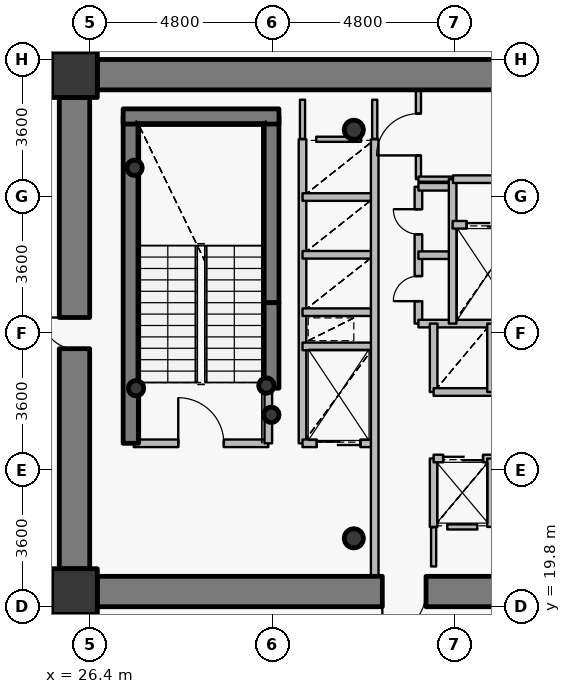
"""IFC4 building model, lengths in metres.
Left out: names, types, materials, properties, quantities, classifications, styles, units other than length and angle.
Written with IfcOpenShell. Run it as: python <this file> out.ifc"""

import sys

from ifc_helpers import new_model, si_unit, direction, frame, frame_2d, origin, origin_2d, place, context, subcontext, project, spatial, rectangle, hollow_circle, extrude, source, transform, mapped, element, fill, save


model = new_model("IFC4")
c1 = context("Model", 3, precision=1e-05, world=origin(), true_north=direction((0.0, 1.0)))
c2 = subcontext(c1, "Body", "Model", "MODEL_VIEW")
j1 = project(units=[si_unit("LENGTHUNIT", "METRE"), si_unit("PLANEANGLEUNIT", "RADIAN")], contexts=[c1])
p1 = place(None, origin())
s1 = spatial("IfcSite", under=j1, at=p1, CompositionType="ELEMENT")
p2 = place(p1, origin())
s2 = spatial("IfcBuilding", under=s1, at=p2, CompositionType="ELEMENT")
p3 = place(p2, frame((0.0, 0.0, 104.7)))
s3 = spatial("IfcBuildingStorey", under=s2, at=p3, CompositionType="ELEMENT", Elevation=104.7)
for number, where, z_axis, x_axis in (
    (1, (26.0, 20.2, 0.0), (0.0, 0.0, 1.0), (1.0, 0.0, 0.0)),
    (2, (26.0, 33.8, 0.0), (0.0, 0.0, 1.0), (1.0, 0.0, 0.0)),
):
    element("IfcColumn", number, at=place(p3, frame(where, z_axis=z_axis, x_axis=x_axis)), inside=s3, PredefinedType="COLUMN", context=c2, shape_type="SweptSolid", body=[
        extrude(rectangle(XDim=1.2, YDim=1.2, at=origin_2d()), origin(), (0.0, 0.0, 1.0), 3.75),
    ])
for number, where, z_axis, x_axis in (
    (3, (33.35, 21.6, 0.0), (0.0, 0.0, 1.0), (1.0, 0.0, 0.0)),
    (4, (33.35, 32.35, 0.0), (0.0, 0.0, 1.0), (1.0, 0.0, 0.0)),
):
    element("IfcColumn", number, at=place(p3, frame(where, z_axis=z_axis, x_axis=x_axis)), inside=s3, PredefinedType="COLUMN", context=c2, shape_type="SweptSolid", body=[
        extrude(hollow_circle(Radius=0.254, WallThickness=0.02, at=origin_2d()), origin(), (0.0, 0.0, 1.0), 3.75),
    ])
p4 = place(p3, frame((27.48, 24.1, 0.0), z_axis=(0.0, 0.0, 1.0), x_axis=(0.0, 1.0, 0.0)))
e5 = element("IfcWall", 5, at=p4, inside=s3, PredefinedType="SHEAR", context=c2, shape_type="SweptSolid", body=[
    extrude(rectangle(XDim=8.6, YDim=0.4, at=frame_2d((4.3, 0.0))), origin(), (0.0, 0.0, 1.0), 3.75),
])
p5 = place(p3, frame((31.18, 27.8, 0.0), z_axis=(0.0, 0.0, 1.0), x_axis=(0.0, 1.0, 0.0)))
e6 = element("IfcWall", 6, at=p5, inside=s3, PredefinedType="SHEAR", context=c2, shape_type="SweptSolid", body=[
    extrude(rectangle(XDim=4.9, YDim=0.4, at=frame_2d((2.45, 0.0))), origin(), (0.0, 0.0, 1.0), 3.75),
])
p6 = place(p3, frame((27.28, 32.7, 0.0), z_axis=(0.0, 0.0, 1.0), x_axis=(1.0, 0.0, 0.0)))
e7 = element("IfcWall", 7, at=p6, inside=s3, PredefinedType="SHEAR", context=c2, shape_type="SweptSolid", body=[
    extrude(rectangle(XDim=4.1, YDim=0.4, at=frame_2d((2.05, 0.0))), origin(), (0.0, 0.0, 1.0), 3.75),
])
for number, where, z_axis, x_axis in (
    (8, (27.58, 31.35, 0.0), (0.0, 0.0, 1.0), (1.0, 0.0, 0.0)),
    (9, (31.05, 25.62, 0.0), (0.0, 0.0, 1.0), (1.0, 0.0, 0.0)),
    (10, (31.18, 24.85, 0.0), (0.0, 0.0, 1.0), (1.0, 0.0, 0.0)),
    (11, (27.62, 25.55, 0.0), (0.0, 0.0, 1.0), (1.0, 0.0, 0.0)),
):
    element("IfcColumn", number, at=place(p3, frame(where, z_axis=z_axis, x_axis=x_axis)), inside=s3, PredefinedType="COLUMN", context=c2, shape_type="SweptSolid", body=[
        extrude(hollow_circle(Radius=0.203, WallThickness=0.016, at=origin_2d()), origin(), (0.0, 0.0, 1.0), 3.75),
    ])
p7 = place(p3, frame((26.6, 33.8, 0.0), z_axis=(0.0, 0.0, 1.0), x_axis=(1.0, 0.0, 0.0)))
e12 = element("IfcWall", 12, at=p7, inside=s3, PredefinedType="SHEAR", context=c2, shape_type="SweptSolid", body=[
    extrude(rectangle(XDim=18.8, YDim=0.8, at=frame_2d((9.4, 0.0))), origin(), (0.0, 0.0, 1.0), 2.95),
])
p8 = place(p3, frame((45.4, 20.2, 0.0), z_axis=(0.0, 0.0, 1.0), x_axis=(-1.0, 0.0, 0.0)))
e13 = element("IfcWall", 13, at=p8, inside=s3, PredefinedType="SHEAR", context=c2, shape_type="SweptSolid", body=[
    extrude(rectangle(XDim=18.8, YDim=0.8, at=frame_2d((9.4, 0.0))), origin(), (0.0, 0.0, 1.0), 2.95),
])
p9 = place(p8, frame((10.15, 0.0, 0.0)))
e14 = element("IfcOpeningElement", 14, at=p9, cuts=e13, PredefinedType="OPENING", context=c2, shape_type="SweptSolid", body=[
    extrude(rectangle(XDim=1.15, YDim=2.15, at=origin_2d()), frame((0.575, 0.41, 1.075), z_axis=(0.0, -1.0, 0.0), x_axis=(1.0, 0.0, 0.0)), (0.0, 0.0, 1.0), 0.82),
])
p10 = place(p3, frame((26.0, 20.8, 0.0), z_axis=(0.0, 0.0, 1.0), x_axis=(0.0, 1.0, 0.0)))
e15 = element("IfcWall", 15, at=p10, inside=s3, PredefinedType="SHEAR", context=c2, shape_type="SweptSolid", body=[
    extrude(rectangle(XDim=12.4, YDim=0.8, at=frame_2d((6.2, 0.0))), origin(), (0.0, 0.0, 1.0), 2.95),
])
p11 = place(p10, frame((5.79, 0.0, 0.0)))
e16 = element("IfcOpeningElement", 16, at=p11, cuts=e15, PredefinedType="OPENING", context=c2, shape_type="SweptSolid", body=[
    extrude(rectangle(XDim=0.82, YDim=2.1, at=origin_2d()), frame((0.41, 0.41, 1.05), z_axis=(0.0, -1.0, 0.0), x_axis=(1.0, 0.0, 0.0)), (0.0, 0.0, 1.0), 0.82),
])
p12 = place(p3, frame((31.18, 25.55, 0.0), z_axis=(0.0, 0.0, 1.0), x_axis=(0.0, 1.0, 0.0)))
e17 = element("IfcWall", 17, at=p12, inside=s3, PredefinedType="SHEAR", context=c2, shape_type="SweptSolid", body=[
    extrude(rectangle(XDim=2.25, YDim=0.4, at=frame_2d((1.125, 0.0))), origin(), (0.0, 0.0, 1.0), 3.1),
])
p13 = place(p3, frame((27.56, 24.1, 0.0), z_axis=(0.0, 0.0, 1.0), x_axis=(1.0, 0.0, 0.0)))
e18 = element("IfcWall", 18, at=p13, inside=s3, PredefinedType="PARTITIONING", context=c2, shape_type="SweptSolid", body=[
    extrude(rectangle(XDim=3.54, YDim=0.2, at=frame_2d((1.77, 0.0))), origin(), (0.0, 0.0, 1.0), 3.5),
])
p14 = place(p13, frame((1.17, 0.0, 0.0)))
e19 = element("IfcOpeningElement", 19, at=p14, cuts=e18, PredefinedType="OPENING", context=c2, shape_type="SweptSolid", body=[
    extrude(rectangle(XDim=1.2, YDim=2.15, at=origin_2d()), frame((0.6, 0.11, 1.075), z_axis=(0.0, -1.0, 0.0), x_axis=(1.0, 0.0, 0.0)), (0.0, 0.0, 1.0), 0.22),
])
p15 = place(p3, frame((31.1, 24.1, 0.0), z_axis=(0.0, 0.0, 1.0), x_axis=(0.0, 1.0, 0.0)))
e20 = element("IfcWall", 20, at=p15, inside=s3, PredefinedType="PARTITIONING", context=c2, shape_type="SweptSolid", body=[
    extrude(rectangle(XDim=1.44, YDim=0.2, at=frame_2d((0.72, 0.0))), origin(), (0.0, 0.0, 1.0), 3.5),
])
p16 = place(p3, frame((32.0, 24.1, 0.0), z_axis=(0.0, 0.0, 1.0), x_axis=(0.0, 1.0, 0.0)))
e21 = element("IfcWall", 21, at=p16, inside=s3, PredefinedType="PARTITIONING", context=c2, shape_type="SweptSolid", body=[
    extrude(rectangle(XDim=8.0, YDim=0.2, at=frame_2d((4.0, 0.0))), origin(), (0.0, 0.0, 1.0), 3.5),
])
p17 = place(p3, frame((32.0, 24.1, 0.0), z_axis=(0.0, 0.0, 1.0), x_axis=(1.0, 0.0, 0.0)))
e22 = element("IfcWall", 22, at=p17, inside=s3, PredefinedType="PARTITIONING", context=c2, shape_type="SweptSolid", body=[
    extrude(rectangle(XDim=1.9, YDim=0.2, at=frame_2d((0.95, 0.0))), origin(), (0.0, 0.0, 1.0), 3.085),
])
p18 = place(p17, frame((0.375, 0.0, 0.0)))
e23 = element("IfcOpeningElement", 23, at=p18, cuts=e22, PredefinedType="OPENING", context=c2, shape_type="SweptSolid", body=[
    extrude(rectangle(XDim=1.15, YDim=2.15, at=origin_2d()), frame((0.575, 0.11, 1.075), z_axis=(0.0, -1.0, 0.0), x_axis=(1.0, 0.0, 0.0)), (0.0, 0.0, 1.0), 0.22),
])
for number, where, z_axis, x_axis in (
    (24, (32.0, 26.65, 0.0), (0.0, 0.0, 1.0), (1.0, 0.0, 0.0)),
    (25, (32.0, 27.55, 0.0), (0.0, 0.0, 1.0), (1.0, 0.0, 0.0)),
    (26, (32.0, 29.06, 0.0), (0.0, 0.0, 1.0), (1.0, 0.0, 0.0)),
    (27, (32.0, 30.58, 0.0), (0.0, 0.0, 1.0), (1.0, 0.0, 0.0)),
):
    element("IfcWall", number, at=place(p3, frame(where, z_axis=z_axis, x_axis=x_axis)), inside=s3, PredefinedType="PARTITIONING", context=c2, shape_type="SweptSolid", body=[
        extrude(rectangle(XDim=1.9, YDim=0.2, at=frame_2d((0.95, 0.0))), origin(), (0.0, 0.0, 1.0), 3.085),
    ])
p19 = place(p3, frame((33.9, 20.6, 0.0), z_axis=(0.0, 0.0, 1.0), x_axis=(0.0, 1.0, 0.0)))
e28 = element("IfcWall", 28, at=p19, inside=s3, PredefinedType="PARTITIONING", context=c2, shape_type="SweptSolid", body=[
    extrude(rectangle(XDim=11.5, YDim=0.2, at=frame_2d((5.75, 0.0))), origin(), (0.0, 0.0, 1.0), 3.085),
])
p20 = place(p3, frame((35.05, 27.25, 0.0), z_axis=(0.0, 0.0, 1.0), x_axis=(0.0, 1.0, 0.0)))
e29 = element("IfcWall", 29, at=p20, inside=s3, PredefinedType="PARTITIONING", context=c2, shape_type="SweptSolid", body=[
    extrude(rectangle(XDim=3.6, YDim=0.2, at=frame_2d((1.8, 0.0))), origin(), (0.0, 0.0, 1.0), 3.5),
])
p21 = place(p20, frame((0.59, 0.0, 0.0)))
e30 = element("IfcOpeningElement", 30, at=p21, cuts=e29, PredefinedType="OPENING", context=c2, shape_type="SweptSolid", body=[
    extrude(rectangle(XDim=0.66, YDim=2.05, at=origin_2d()), frame((0.33, 0.11, 1.025), z_axis=(0.0, -1.0, 0.0), x_axis=(1.0, 0.0, 0.0)), (0.0, 0.0, 1.0), 0.22),
])
p22 = place(p20, frame((2.35, 0.0, 0.0)))
e31 = element("IfcOpeningElement", 31, at=p22, cuts=e29, PredefinedType="OPENING", context=c2, shape_type="SweptSolid", body=[
    extrude(rectangle(XDim=0.66, YDim=2.05, at=origin_2d()), frame((0.33, 0.11, 1.025), z_axis=(0.0, -1.0, 0.0), x_axis=(1.0, 0.0, 0.0)), (0.0, 0.0, 1.0), 0.22),
])
p23 = place(p3, frame((35.05, 27.25, 0.0), z_axis=(0.0, 0.0, 1.0), x_axis=(1.0, 0.0, 0.0)))
e32 = element("IfcWall", 32, at=p23, inside=s3, PredefinedType="PARTITIONING", context=c2, shape_type="SweptSolid", body=[
    extrude(rectangle(XDim=4.95, YDim=0.2, at=frame_2d((2.475, 0.0))), origin(), (0.0, 0.0, 1.0), 3.085),
])
for number, where, z_axis, x_axis in (
    (33, (35.05, 29.05, 0.0), (0.0, 0.0, 1.0), (1.0, 0.0, 0.0)),
    (34, (35.05, 30.85, 0.0), (0.0, 0.0, 1.0), (1.0, 0.0, 0.0)),
):
    element("IfcWall", number, at=place(p3, frame(where, z_axis=z_axis, x_axis=x_axis)), inside=s3, PredefinedType="PARTITIONING", context=c2, shape_type="SweptSolid", body=[
        extrude(rectangle(XDim=0.9, YDim=0.2, at=frame_2d((0.45, 0.0))), origin(), (0.0, 0.0, 1.0), 3.5),
    ])
p24 = place(p3, frame((35.05, 31.05, 0.0), z_axis=(0.0, 0.0, 1.0), x_axis=(0.0, 1.0, 0.0)))
e35 = element("IfcWall", 35, at=p24, inside=s3, PredefinedType="PARTITIONING", context=c2, shape_type="SweptSolid", body=[
    extrude(rectangle(XDim=2.35, YDim=0.135, at=frame_2d((1.175, 0.0))), origin(), (0.0, 0.0, 1.0), 3.085),
])
p25 = place(p24, frame((0.625, 0.0, 0.0)))
e36 = element("IfcOpeningElement", 36, at=p25, cuts=e35, PredefinedType="OPENING", context=c2, shape_type="SweptSolid", body=[
    extrude(rectangle(XDim=1.1, YDim=2.15, at=origin_2d()), frame((0.55, 0.078, 1.075), z_axis=(0.0, -1.0, 0.0), x_axis=(1.0, 0.0, 0.0)), (0.0, 0.0, 1.0), 0.155),
])
p26 = place(p3, frame((35.05, 31.05, 0.0), z_axis=(0.0, 0.0, 1.0), x_axis=(1.0, 0.0, 0.0)))
e37 = element("IfcWall", 37, at=p26, inside=s3, PredefinedType="PARTITIONING", context=c2, shape_type="SweptSolid", body=[
    extrude(rectangle(XDim=0.9, YDim=0.135, at=frame_2d((0.45, 0.0))), origin(), (0.0, 0.0, 1.0), 3.5),
])
p27 = place(p3, frame((35.45, 21.9, 0.0), z_axis=(0.0, 0.0, 1.0), x_axis=(0.0, 1.0, 0.0)))
e38 = element("IfcWall", 38, at=p27, inside=s3, PredefinedType="PARTITIONING", context=c2, shape_type="SweptSolid", body=[
    extrude(rectangle(XDim=1.8, YDim=0.2, at=frame_2d((0.9, 0.0))), origin(), (0.0, 0.0, 1.0), 3.5),
])
p28 = place(p3, frame((35.45, 23.7, 0.0), z_axis=(0.0, 0.0, 1.0), x_axis=(1.0, 0.0, 0.0)))
e39 = element("IfcWall", 39, at=p28, inside=s3, PredefinedType="PARTITIONING", context=c2, shape_type="SweptSolid", body=[
    extrude(rectangle(XDim=4.55, YDim=0.2, at=frame_2d((2.275, 0.0))), origin(), (0.0, 0.0, 1.0), 3.085),
])
p29 = place(p28, frame((0.25, 0.0, 0.0)))
e40 = element("IfcOpeningElement", 40, at=p29, cuts=e39, PredefinedType="OPENING", context=c2, shape_type="SweptSolid", body=[
    extrude(rectangle(XDim=1.05, YDim=2.15, at=origin_2d()), frame((0.525, 0.11, 1.075), z_axis=(0.0, -1.0, 0.0), x_axis=(1.0, 0.0, 0.0)), (0.0, 0.0, 1.0), 0.22),
])
p30 = place(p28, frame((1.745, 0.0, 0.0)))
e41 = element("IfcOpeningElement", 41, at=p30, cuts=e39, PredefinedType="OPENING", context=c2, shape_type="SweptSolid", body=[
    extrude(rectangle(XDim=1.05, YDim=2.15, at=origin_2d()), frame((0.525, 0.11, 1.075), z_axis=(0.0, -1.0, 0.0), x_axis=(1.0, 0.0, 0.0)), (0.0, 0.0, 1.0), 0.22),
])
p31 = place(p28, frame((3.165, 0.0, 0.0)))
e42 = element("IfcOpeningElement", 42, at=p31, cuts=e39, PredefinedType="OPENING", context=c2, shape_type="SweptSolid", body=[
    extrude(rectangle(XDim=1.05, YDim=2.15, at=origin_2d()), frame((0.525, 0.11, 1.075), z_axis=(0.0, -1.0, 0.0), x_axis=(1.0, 0.0, 0.0)), (0.0, 0.0, 1.0), 0.22),
])
p32 = place(p3, frame((35.45, 25.45, 0.0), z_axis=(0.0, 0.0, 1.0), x_axis=(0.0, 1.0, 0.0)))
e43 = element("IfcWall", 43, at=p32, inside=s3, PredefinedType="PARTITIONING", context=c2, shape_type="SweptSolid", body=[
    extrude(rectangle(XDim=1.8, YDim=0.2, at=frame_2d((0.9, 0.0))), origin(), (0.0, 0.0, 1.0), 3.5),
])
p33 = place(p3, frame((35.45, 25.45, 0.0), z_axis=(0.0, 0.0, 1.0), x_axis=(1.0, 0.0, 0.0)))
e44 = element("IfcWall", 44, at=p33, inside=s3, PredefinedType="PARTITIONING", context=c2, shape_type="SweptSolid", body=[
    extrude(rectangle(XDim=4.55, YDim=0.2, at=frame_2d((2.275, 0.0))), origin(), (0.0, 0.0, 1.0), 3.085),
])
p34 = place(p3, frame((35.95, 27.25, 0.0), z_axis=(0.0, 0.0, 1.0), x_axis=(0.0, 1.0, 0.0)))
e45 = element("IfcWall", 45, at=p34, inside=s3, PredefinedType="PARTITIONING", context=c2, shape_type="SweptSolid", body=[
    extrude(rectangle(XDim=3.8, YDim=0.2, at=frame_2d((1.9, 0.0))), origin(), (0.0, 0.0, 1.0), 3.5),
])
p35 = place(p3, frame((35.95, 29.85, 0.0), z_axis=(0.0, 0.0, 1.0), x_axis=(1.0, 0.0, 0.0)))
e46 = element("IfcWall", 46, at=p35, inside=s3, PredefinedType="PARTITIONING", context=c2, shape_type="SweptSolid", body=[
    extrude(rectangle(XDim=8.49, YDim=0.2, at=frame_2d((4.245, 0.0))), origin(), (0.0, 0.0, 1.0), 3.085),
])
p36 = place(p35, frame((6.1, 0.0, 0.0)))
e47 = element("IfcOpeningElement", 47, at=p36, cuts=e46, PredefinedType="OPENING", context=c2, shape_type="SweptSolid", body=[
    extrude(rectangle(XDim=1.2, YDim=2.15, at=origin_2d()), frame((0.6, 0.11, 1.075), z_axis=(0.0, -1.0, 0.0), x_axis=(1.0, 0.0, 0.0)), (0.0, 0.0, 1.0), 0.22),
])
p37 = place(p35, frame((0.37, 0.0, 0.0)))
e48 = element("IfcOpeningElement", 48, at=p37, cuts=e46, PredefinedType="OPENING", context=c2, shape_type="SweptSolid", body=[
    extrude(rectangle(XDim=1.15, YDim=2.15, at=origin_2d()), frame((0.575, 0.11, 1.075), z_axis=(0.0, -1.0, 0.0), x_axis=(1.0, 0.0, 0.0)), (0.0, 0.0, 1.0), 0.22),
])
p38 = place(p35, frame((2.425, 0.0, 0.0)))
e49 = element("IfcOpeningElement", 49, at=p38, cuts=e46, PredefinedType="OPENING", context=c2, shape_type="SweptSolid", body=[
    extrude(rectangle(XDim=1.05, YDim=2.15, at=origin_2d()), frame((0.525, 0.11, 1.075), z_axis=(0.0, -1.0, 0.0), x_axis=(1.0, 0.0, 0.0)), (0.0, 0.0, 1.0), 0.22),
])
p39 = place(p3, frame((35.96, 31.05, 0.0), z_axis=(0.0, 0.0, 1.0), x_axis=(1.0, 0.0, 0.0)))
e50 = element("IfcWall", 50, at=p39, inside=s3, PredefinedType="PARTITIONING", context=c2, shape_type="SweptSolid", body=[
    extrude(rectangle(XDim=1.84, YDim=0.2, at=frame_2d((0.92, 0.0))), origin(), (0.0, 0.0, 1.0), 3.5),
])
for number, where, z_axis, x_axis in (
    (51, (36.96, 21.9, 0.0), (0.0, 0.0, 1.0), (0.0, 1.0, 0.0)),
    (52, (36.96, 25.45, 0.0), (0.0, 0.0, 1.0), (0.0, 1.0, 0.0)),
):
    element("IfcWall", number, at=place(p3, frame(where, z_axis=z_axis, x_axis=x_axis)), inside=s3, PredefinedType="PARTITIONING", context=c2, shape_type="SweptSolid", body=[
        extrude(rectangle(XDim=1.8, YDim=0.2, at=frame_2d((0.9, 0.0))), origin(), (0.0, 0.0, 1.0), 3.5),
    ])
p40 = place(p3, frame((36.6, 21.9, 0.0), z_axis=(0.0, 0.0, 1.0), x_axis=(-1.0, 0.0, 0.0)))
e53 = element("IfcWall", 53, at=p40, inside=s3, PredefinedType="PARTITIONING", context=c2, shape_type="SweptSolid", body=[
    extrude(rectangle(XDim=0.79, YDim=0.135, at=frame_2d((0.395, 0.0))), origin(), (0.0, 0.0, 1.0), 3.5),
])
p41 = place(p3, frame((32.36, 32.1, 0.0), z_axis=(0.0, 0.0, 1.0), x_axis=(1.0, 0.0, 0.0)))
e54 = element("IfcWall", 54, at=p41, inside=s3, PredefinedType="PARTITIONING", context=c2, shape_type="SweptSolid", body=[
    extrude(rectangle(XDim=1.18, YDim=0.135, at=frame_2d((0.59, 0.0))), origin(), (0.0, 0.0, 1.0), 3.085),
])
p42 = place(p3, frame((32.0, 33.14, 0.0), z_axis=(0.0, 0.0, 1.0), x_axis=(0.0, -1.0, 0.0)))
e55 = element("IfcWall", 55, at=p42, inside=s3, PredefinedType="PARTITIONING", context=c2, shape_type="SweptSolid", body=[
    extrude(rectangle(XDim=1.03, YDim=0.135, at=frame_2d((0.515, 0.0))), origin(), (0.0, 0.0, 1.0), 3.035),
])
for number, where, z_axis, x_axis in (
    (56, (35.45, 21.89, 0.0), (0.0, 0.0, 1.0), (0.0, -1.0, 0.0)),
    (57, (33.9, 32.11, 0.0), (0.0, 0.0, 1.0), (0.0, 1.0, 0.0)),
):
    element("IfcWall", number, at=place(p3, frame(where, z_axis=z_axis, x_axis=x_axis)), inside=s3, PredefinedType="PARTITIONING", context=c2, shape_type="SweptSolid", body=[
        extrude(rectangle(XDim=1.03, YDim=0.135, at=frame_2d((0.515, 0.0))), origin(), (0.0, 0.0, 1.0), 3.085),
    ])
p43 = place(p3, frame((26.59, 34.2, 0.0), z_axis=(0.0, 0.0, 1.0), x_axis=(-1.0, 0.0, 0.0)))
e58 = element("IfcWall", 58, at=p43, inside=s3, PredefinedType="PARTITIONING", context=c2, shape_type="SweptSolid", body=[
    extrude(rectangle(XDim=0.99, YDim=0.135, at=frame_2d((0.495, 0.0))), origin(), (0.0, 0.0, 1.0), 2.935),
])
p44 = place(p3, frame((25.6, 33.893, 0.0), z_axis=(0.0, 0.0, 1.0), x_axis=(0.0, -1.0, 0.0)))
e59 = element("IfcWall", 59, at=p44, inside=s3, PredefinedType="PARTITIONING", context=c2, shape_type="SweptSolid", body=[
    extrude(rectangle(XDim=0.683, YDim=0.135, at=frame_2d((0.341, 0.0))), origin(), (0.0, 0.0, 1.0), 3.5),
])
p45 = place(p3, frame((25.6, 20.79, 0.0), z_axis=(0.0, 0.0, 1.0), x_axis=(0.0, -1.0, 0.0)))
e60 = element("IfcWall", 60, at=p45, inside=s3, PredefinedType="PARTITIONING", context=c2, shape_type="SweptSolid", body=[
    extrude(rectangle(XDim=0.99, YDim=0.135, at=frame_2d((0.495, 0.0))), origin(), (0.0, 0.0, 1.0), 3.5),
])
p46 = place(p3, frame((25.907, 19.8, 0.0), z_axis=(0.0, 0.0, 1.0), x_axis=(1.0, 0.0, 0.0)))
e61 = element("IfcWall", 61, at=p46, inside=s3, PredefinedType="PARTITIONING", context=c2, shape_type="SweptSolid", body=[
    extrude(rectangle(XDim=0.683, YDim=0.135, at=frame_2d((0.341, 0.0))), origin(), (0.0, 0.0, 1.0), 2.935),
])
m1 = source(origin(), c2, "Body", "SweptSolid", [
    extrude(rectangle(XDim=0.82, YDim=2.1, at=origin_2d()), frame((0.41, 0.025, 1.05), z_axis=(0.0, -1.0, 0.0), x_axis=(1.0, 0.0, 0.0)), (0.0, 0.0, 1.0), 0.05),
])
p47 = place(p11, origin())
e62 = element("IfcDoor", 62, at=p47, inside=s3, OperationType="SINGLE_SWING_RIGHT", PredefinedType="DOOR", context=c2, shape_type="MappedRepresentation", body=[
    mapped(m1, transform((0.0, 0.0, 0.0), x_axis=(1.0, 0.0, 0.0), y_axis=(0.0, 1.0, 0.0), z_axis=(0.0, 0.0, 1.0), scale=1.0)),
])
fill(e16, e62)
m2 = source(origin(), c2, "Body", "SweptSolid", [
    extrude(rectangle(XDim=1.15, YDim=2.15, at=origin_2d()), frame((0.575, 0.025, 1.075), z_axis=(0.0, -1.0, 0.0), x_axis=(1.0, 0.0, 0.0)), (0.0, 0.0, 1.0), 0.05),
])
p48 = place(p9, origin())
e63 = element("IfcDoor", 63, at=p48, inside=s3, OperationType="SINGLE_SWING_RIGHT", PredefinedType="DOOR", context=c2, shape_type="MappedRepresentation", body=[
    mapped(m2, transform((0.0, 0.0, 0.0), x_axis=(1.0, 0.0, 0.0), y_axis=(0.0, 1.0, 0.0), z_axis=(0.0, 0.0, 1.0), scale=1.0)),
])
fill(e14, e63)
m3 = source(origin(), c2, "Body", "SweptSolid", [
    extrude(rectangle(XDim=1.2, YDim=2.15, at=origin_2d()), frame((0.6, 0.025, 1.075), z_axis=(0.0, -1.0, 0.0), x_axis=(1.0, 0.0, 0.0)), (0.0, 0.0, 1.0), 0.05),
])
p49 = place(p14, origin())
e64 = element("IfcDoor", 64, at=p49, inside=s3, OperationType="SINGLE_SWING_LEFT", PredefinedType="DOOR", context=c2, shape_type="MappedRepresentation", body=[
    mapped(m3, transform((0.0, 0.0, 0.0), x_axis=(1.0, 0.0, 0.0), y_axis=(0.0, 1.0, 0.0), z_axis=(0.0, 0.0, 1.0), scale=1.0)),
])
fill(e19, e64)
m4 = source(origin(), c2, "Body", "SweptSolid", [
    extrude(rectangle(XDim=1.15, YDim=2.15, at=origin_2d()), frame((0.575, 0.025, 1.075), z_axis=(0.0, -1.0, 0.0), x_axis=(1.0, 0.0, 0.0)), (0.0, 0.0, 1.0), 0.05),
])
p50 = place(p37, origin())
e65 = element("IfcDoor", 65, at=p50, inside=s3, OperationType="DOUBLE_DOOR_SLIDING", PredefinedType="USERDEFINED", context=c2, shape_type="MappedRepresentation", body=[
    mapped(m4, transform((0.0, 0.0, 0.0), x_axis=(1.0, 0.0, 0.0), y_axis=(0.0, 1.0, 0.0), z_axis=(0.0, 0.0, 1.0), scale=1.0)),
])
fill(e48, e65)
p51 = place(p18, origin())
e66 = element("IfcDoor", 66, at=p51, inside=s3, OperationType="DOUBLE_DOOR_SLIDING", PredefinedType="USERDEFINED", context=c2, shape_type="MappedRepresentation", body=[
    mapped(m4, transform((0.0, 0.0, 0.0), x_axis=(1.0, 0.0, 0.0), y_axis=(0.0, 1.0, 0.0), z_axis=(0.0, 0.0, 1.0), scale=1.0)),
])
fill(e23, e66)
m5 = source(origin(), c2, "Body", "SweptSolid", [
    extrude(rectangle(XDim=1.05, YDim=2.15, at=origin_2d()), frame((0.525, 0.025, 1.075), z_axis=(0.0, -1.0, 0.0), x_axis=(1.0, 0.0, 0.0)), (0.0, 0.0, 1.0), 0.05),
])
p52 = place(p29, origin())
e67 = element("IfcDoor", 67, at=p52, inside=s3, OperationType="DOUBLE_DOOR_SLIDING", PredefinedType="USERDEFINED", context=c2, shape_type="MappedRepresentation", body=[
    mapped(m5, transform((0.0, 0.0, 0.0), x_axis=(1.0, 0.0, 0.0), y_axis=(0.0, 1.0, 0.0), z_axis=(0.0, 0.0, 1.0), scale=1.0)),
])
fill(e40, e67)
m6 = source(origin(), c2, "Body", "SweptSolid", [
    extrude(rectangle(XDim=0.66, YDim=2.05, at=origin_2d()), frame((0.33, 0.025, 1.025), z_axis=(0.0, -1.0, 0.0), x_axis=(1.0, 0.0, 0.0)), (0.0, 0.0, 1.0), 0.05),
])
p53 = place(p21, origin())
e68 = element("IfcDoor", 68, at=p53, inside=s3, OperationType="SINGLE_SWING_LEFT", PredefinedType="USERDEFINED", context=c2, shape_type="MappedRepresentation", body=[
    mapped(m6, transform((0.0, 0.0, 0.0), x_axis=(1.0, 0.0, 0.0), y_axis=(0.0, 1.0, 0.0), z_axis=(0.0, 0.0, 1.0), scale=1.0)),
])
fill(e30, e68)
p54 = place(p22, origin())
e69 = element("IfcDoor", 69, at=p54, inside=s3, OperationType="SINGLE_SWING_RIGHT", PredefinedType="USERDEFINED", context=c2, shape_type="MappedRepresentation", body=[
    mapped(m6, transform((0.0, 0.0, 0.0), x_axis=(1.0, 0.0, 0.0), y_axis=(0.0, 1.0, 0.0), z_axis=(0.0, 0.0, 1.0), scale=1.0)),
])
fill(e31, e69)
m7 = source(origin(), c2, "Body", "SweptSolid", [
    extrude(rectangle(XDim=1.1, YDim=2.15, at=origin_2d()), frame((0.55, 0.025, 1.075), z_axis=(0.0, -1.0, 0.0), x_axis=(1.0, 0.0, 0.0)), (0.0, 0.0, 1.0), 0.05),
])
p55 = place(p25, origin())
e70 = element("IfcDoor", 70, at=p55, inside=s3, OperationType="SINGLE_SWING_LEFT", PredefinedType="DOOR", context=c2, shape_type="MappedRepresentation", body=[
    mapped(m7, transform((0.0, 0.0, 0.0), x_axis=(1.0, 0.0, 0.0), y_axis=(0.0, 1.0, 0.0), z_axis=(0.0, 0.0, 1.0), scale=1.0)),
])
fill(e36, e70)
save(model, sys.argv[1])
